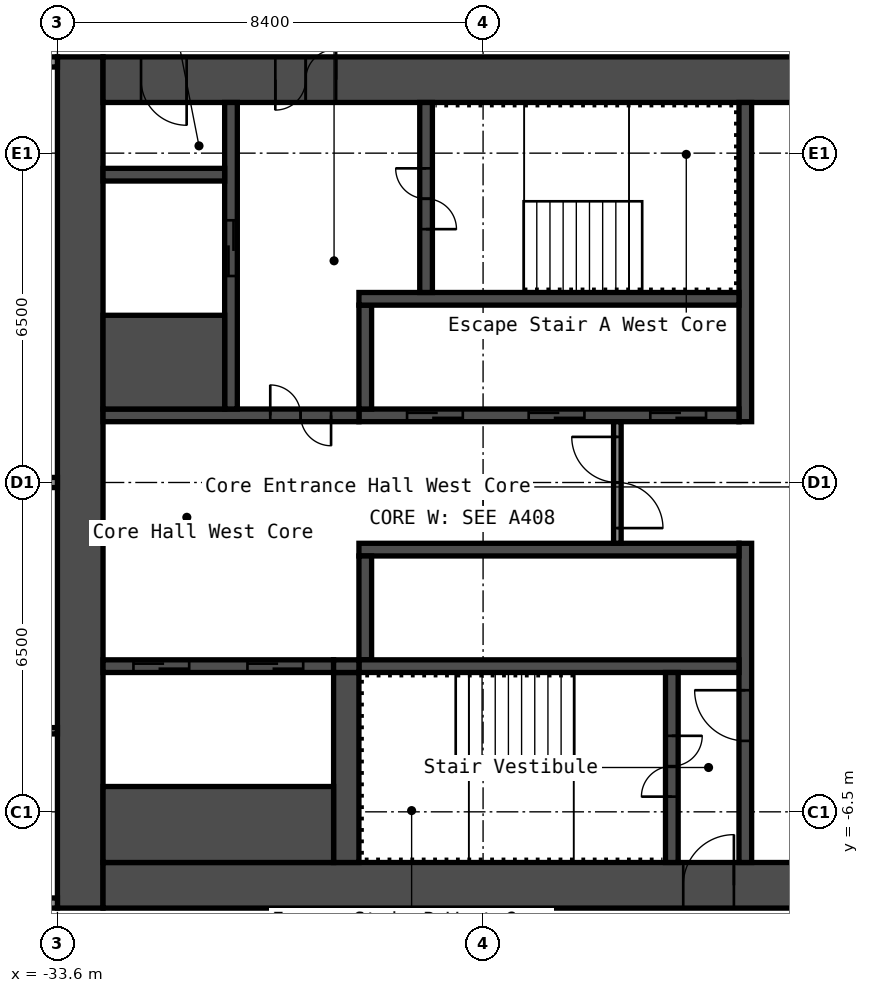
"""IFC4 building model, lengths in metres.
Left out: names, types, materials, properties, quantities, classifications, styles, units other than length and angle.
Written with IfcOpenShell. Run it as: python <this file> out.ifc"""

import sys

from ifc_helpers import new_model, si_unit, direction, frame, frame_2d, origin, place, context, subcontext, project, spatial, rectangle, extrude, element, fill, save


model = new_model("IFC4")
c1 = context("Model", 3, precision=1e-05, world=origin(), true_north=direction((0.0, 1.0)))
c2 = subcontext(c1, "Body", "Model", "MODEL_VIEW")
j1 = project(units=[si_unit("LENGTHUNIT", "METRE"), si_unit("PLANEANGLEUNIT", "RADIAN")], contexts=[c1])
p1 = place(None, origin())
s1 = spatial("IfcSite", under=j1, at=p1, CompositionType="ELEMENT")
p2 = place(p1, origin())
s2 = spatial("IfcBuilding", under=s1, at=p2, CompositionType="ELEMENT")
p3 = place(p2, frame((0.0, 0.0, 58.2)))
s3 = spatial("IfcBuildingStorey", under=s2, at=p3, CompositionType="ELEMENT", Elevation=58.2)
p4 = place(p3, frame((-33.15, -8.4, 0.0), z_axis=(0.0, 0.0, 1.0), x_axis=(0.0, 1.0, 0.0)))
e1 = element("IfcWall", 1, at=p4, inside=s3, PredefinedType="SHEAR", context=c2, shape_type="SweptSolid", body=[
    extrude(rectangle(XDim=16.8, YDim=0.9, at=frame_2d((8.4, 0.0))), origin(), (0.0, 0.0, 1.0), 2.8),
])
p5 = place(p3, frame((-32.7, 7.95, 0.0), z_axis=(0.0, 0.0, 1.0), x_axis=(1.0, 0.0, 0.0)))
e2 = element("IfcWall", 2, at=p5, inside=s3, PredefinedType="SHEAR", context=c2, shape_type="SweptSolid", body=[
    extrude(rectangle(XDim=15.0, YDim=0.9, at=frame_2d((7.5, 0.0))), origin(), (0.0, 0.0, 1.0), 2.8),
])
p6 = place(p5, frame((3.4, 0.0, 0.0)))
e3 = element("IfcOpeningElement", 3, at=p6, cuts=e2, PredefinedType="OPENING", context=c2, shape_type="SweptSolid", body=[
    extrude(rectangle(XDim=1.2, YDim=2.1, at=frame_2d((0.6, 1.05))), frame((0.0, 0.46, 0.0), z_axis=(0.0, -1.0, 0.0), x_axis=(1.0, 0.0, 0.0)), (0.0, 0.0, 1.0), 0.92),
])
p7 = place(p5, frame((0.75, 0.0, 0.0)))
e4 = element("IfcOpeningElement", 4, at=p7, cuts=e2, PredefinedType="OPENING", context=c2, shape_type="SweptSolid", body=[
    extrude(rectangle(XDim=0.9, YDim=2.1, at=frame_2d((0.45, 1.05))), frame((0.0, 0.46, 0.0), z_axis=(0.0, -1.0, 0.0), x_axis=(1.0, 0.0, 0.0)), (0.0, 0.0, 1.0), 0.92),
])
p8 = place(p3, frame((-32.7, -7.95, 0.0), z_axis=(0.0, 0.0, 1.0), x_axis=(1.0, 0.0, 0.0)))
e5 = element("IfcWall", 5, at=p8, inside=s3, PredefinedType="SHEAR", context=c2, shape_type="SweptSolid", body=[
    extrude(rectangle(XDim=15.0, YDim=0.9, at=frame_2d((7.5, 0.0))), origin(), (0.0, 0.0, 1.0), 2.8),
])
p9 = place(p8, frame((11.45, 0.0, 0.0)))
e6 = element("IfcOpeningElement", 6, at=p9, cuts=e5, PredefinedType="OPENING", context=c2, shape_type="SweptSolid", body=[
    extrude(rectangle(XDim=1.0, YDim=2.1, at=frame_2d((0.5, 1.05))), frame((0.0, 0.46, 0.0), z_axis=(0.0, -1.0, 0.0), x_axis=(1.0, 0.0, 0.0)), (0.0, 0.0, 1.0), 0.92),
])
p10 = place(p3, frame((-20.025, 1.2, 0.0), z_axis=(0.0, 0.0, 1.0), x_axis=(0.0, 1.0, 0.0)))
e7 = element("IfcWall", 7, at=p10, inside=s3, PredefinedType="SHEAR", context=c2, shape_type="SweptSolid", body=[
    extrude(rectangle(XDim=6.3, YDim=0.25, at=frame_2d((3.15, 0.0))), origin(), (0.0, 0.0, 1.0), 2.8),
])
p11 = place(p3, frame((-20.025, -7.5, 0.0), z_axis=(0.0, 0.0, 1.0), x_axis=(0.0, 1.0, 0.0)))
e8 = element("IfcWall", 8, at=p11, inside=s3, PredefinedType="SHEAR", context=c2, shape_type="SweptSolid", body=[
    extrude(rectangle(XDim=6.3, YDim=0.25, at=frame_2d((3.15, 0.0))), origin(), (0.0, 0.0, 1.0), 2.8),
])
p12 = place(p11, frame((2.4, 0.0, 0.0)))
e9 = element("IfcOpeningElement", 9, at=p12, cuts=e8, PredefinedType="OPENING", context=c2, shape_type="SweptSolid", body=[
    extrude(rectangle(XDim=1.0, YDim=2.1, at=frame_2d((0.5, 1.05))), frame((0.0, 0.135, 0.0), z_axis=(0.0, -1.0, 0.0), x_axis=(1.0, 0.0, 0.0)), (0.0, 0.0, 1.0), 0.27),
])
p13 = place(p3, frame((-27.65, 1.325, 0.0), z_axis=(0.0, 0.0, 1.0), x_axis=(1.0, 0.0, 0.0)))
e10 = element("IfcWall", 10, at=p13, inside=s3, PredefinedType="SHEAR", context=c2, shape_type="SweptSolid", body=[
    extrude(rectangle(XDim=7.5, YDim=0.25, at=frame_2d((3.75, 0.0))), origin(), (0.0, 0.0, 1.0), 2.8),
])
p14 = place(p13, frame((5.75, 0.0, 0.0)))
e11 = element("IfcOpeningElement", 11, at=p14, cuts=e10, PredefinedType="OPENING", context=c2, shape_type="SweptSolid", body=[
    extrude(rectangle(XDim=1.1, YDim=2.1, at=frame_2d((0.55, 1.05))), frame((0.0, 0.135, 0.0), z_axis=(0.0, -1.0, 0.0), x_axis=(1.0, 0.0, 0.0)), (0.0, 0.0, 1.0), 0.27),
])
p15 = place(p13, frame((3.35, 0.0, 0.0)))
e12 = element("IfcOpeningElement", 12, at=p15, cuts=e10, PredefinedType="OPENING", context=c2, shape_type="SweptSolid", body=[
    extrude(rectangle(XDim=1.1, YDim=2.1, at=frame_2d((0.55, 1.05))), frame((0.0, 0.135, 0.0), z_axis=(0.0, -1.0, 0.0), x_axis=(1.0, 0.0, 0.0)), (0.0, 0.0, 1.0), 0.27),
])
p16 = place(p13, frame((0.95, 0.0, 0.0)))
e13 = element("IfcOpeningElement", 13, at=p16, cuts=e10, PredefinedType="OPENING", context=c2, shape_type="SweptSolid", body=[
    extrude(rectangle(XDim=1.1, YDim=2.1, at=frame_2d((0.55, 1.05))), frame((0.0, 0.135, 0.0), z_axis=(0.0, -1.0, 0.0), x_axis=(1.0, 0.0, 0.0)), (0.0, 0.0, 1.0), 0.27),
])
p17 = place(p3, frame((-27.525, 1.45, 0.0), z_axis=(0.0, 0.0, 1.0), x_axis=(0.0, 1.0, 0.0)))
e14 = element("IfcWall", 14, at=p17, inside=s3, PredefinedType="SHEAR", context=c2, shape_type="SweptSolid", body=[
    extrude(rectangle(XDim=2.05, YDim=0.25, at=frame_2d((1.025, 0.0))), origin(), (0.0, 0.0, 1.0), 2.8),
])
p18 = place(p3, frame((-27.65, 3.625, 0.0), z_axis=(0.0, 0.0, 1.0), x_axis=(1.0, 0.0, 0.0)))
e15 = element("IfcWall", 15, at=p18, inside=s3, PredefinedType="SHEAR", context=c2, shape_type="SweptSolid", body=[
    extrude(rectangle(XDim=7.5, YDim=0.25, at=frame_2d((3.75, 0.0))), origin(), (0.0, 0.0, 1.0), 2.8),
])
p19 = place(p3, frame((-26.325, 3.75, 0.0), z_axis=(0.0, 0.0, 1.0), x_axis=(0.0, 1.0, 0.0)))
e16 = element("IfcWall", 16, at=p19, inside=s3, PredefinedType="SHEAR", context=c2, shape_type="SweptSolid", body=[
    extrude(rectangle(XDim=3.75, YDim=0.25, at=frame_2d((1.875, 0.0))), origin(), (0.0, 0.0, 1.0), 2.8),
])
p20 = place(p19, frame((1.25, 0.0, 0.0)))
e17 = element("IfcOpeningElement", 17, at=p20, cuts=e16, PredefinedType="OPENING", context=c2, shape_type="SweptSolid", body=[
    extrude(rectangle(XDim=1.2, YDim=2.1, at=frame_2d((0.6, 1.05))), frame((0.0, 0.135, 0.0), z_axis=(0.0, -1.0, 0.0), x_axis=(1.0, 0.0, 0.0)), (0.0, 0.0, 1.0), 0.27),
])
p21 = place(p3, frame((-32.7, 1.325, 0.0), z_axis=(0.0, 0.0, 1.0), x_axis=(1.0, 0.0, 0.0)))
e18 = element("IfcWall", 18, at=p21, inside=s3, PredefinedType="SHEAR", context=c2, shape_type="SweptSolid", body=[
    extrude(rectangle(XDim=5.05, YDim=0.25, at=frame_2d((2.525, 0.0))), origin(), (0.0, 0.0, 1.0), 2.8),
])
p22 = place(p21, frame((3.3, 0.0, 0.0)))
e19 = element("IfcOpeningElement", 19, at=p22, cuts=e18, PredefinedType="OPENING", context=c2, shape_type="SweptSolid", body=[
    extrude(rectangle(XDim=1.2, YDim=2.1, at=frame_2d((0.6, 1.05))), frame((0.0, 0.135, 0.0), z_axis=(0.0, -1.0, 0.0), x_axis=(1.0, 0.0, 0.0)), (0.0, 0.0, 1.0), 0.27),
])
p23 = place(p3, frame((-30.175, 1.45, 0.0), z_axis=(0.0, 0.0, 1.0), x_axis=(0.0, 1.0, 0.0)))
e20 = element("IfcWall", 20, at=p23, inside=s3, PredefinedType="SHEAR", context=c2, shape_type="SweptSolid", body=[
    extrude(rectangle(XDim=6.05, YDim=0.25, at=frame_2d((3.025, 0.0))), origin(), (0.0, 0.0, 1.0), 2.8),
])
p24 = place(p23, frame((2.625, 0.0, 0.0)))
e21 = element("IfcOpeningElement", 21, at=p24, cuts=e20, PredefinedType="OPENING", context=c2, shape_type="SweptSolid", body=[
    extrude(rectangle(XDim=1.1, YDim=2.1, at=frame_2d((0.55, 1.05))), frame((0.0, 0.135, 0.0), z_axis=(0.0, -1.0, 0.0), x_axis=(1.0, 0.0, 0.0)), (0.0, 0.0, 1.0), 0.27),
])
p25 = place(p3, frame((-32.7, 2.375, 0.0), z_axis=(0.0, 0.0, 1.0), x_axis=(1.0, 0.0, 0.0)))
e22 = element("IfcWall", 22, at=p25, inside=s3, PredefinedType="SHEAR", context=c2, shape_type="SweptSolid", body=[
    extrude(rectangle(XDim=2.4, YDim=1.85, at=frame_2d((1.2, 0.0))), origin(), (0.0, 0.0, 1.0), 2.8),
])
p26 = place(p3, frame((-32.7, 6.075, 0.0), z_axis=(0.0, 0.0, 1.0), x_axis=(1.0, 0.0, 0.0)))
e23 = element("IfcWall", 23, at=p26, inside=s3, PredefinedType="SHEAR", context=c2, shape_type="SweptSolid", body=[
    extrude(rectangle(XDim=2.4, YDim=0.25, at=frame_2d((1.2, 0.0))), origin(), (0.0, 0.0, 1.0), 2.8),
])
p27 = place(p3, frame((-27.65, -1.325, 0.0), z_axis=(0.0, 0.0, 1.0), x_axis=(1.0, 0.0, 0.0)))
e24 = element("IfcWall", 24, at=p27, inside=s3, PredefinedType="SHEAR", context=c2, shape_type="SweptSolid", body=[
    extrude(rectangle(XDim=7.5, YDim=0.25, at=frame_2d((3.75, 0.0))), origin(), (0.0, 0.0, 1.0), 2.8),
])
p28 = place(p3, frame((-27.525, -3.5, 0.0), z_axis=(0.0, 0.0, 1.0), x_axis=(0.0, 1.0, 0.0)))
e25 = element("IfcWall", 25, at=p28, inside=s3, PredefinedType="SHEAR", context=c2, shape_type="SweptSolid", body=[
    extrude(rectangle(XDim=2.05, YDim=0.25, at=frame_2d((1.025, 0.0))), origin(), (0.0, 0.0, 1.0), 2.8),
])
p29 = place(p3, frame((-27.65, -3.625, 0.0), z_axis=(0.0, 0.0, 1.0), x_axis=(1.0, 0.0, 0.0)))
e26 = element("IfcWall", 26, at=p29, inside=s3, PredefinedType="SHEAR", context=c2, shape_type="SweptSolid", body=[
    extrude(rectangle(XDim=7.5, YDim=0.25, at=frame_2d((3.75, 0.0))), origin(), (0.0, 0.0, 1.0), 2.8),
])
p30 = place(p3, frame((-21.475, -7.5, 0.0), z_axis=(0.0, 0.0, 1.0), x_axis=(0.0, 1.0, 0.0)))
e27 = element("IfcWall", 27, at=p30, inside=s3, PredefinedType="SHEAR", context=c2, shape_type="SweptSolid", body=[
    extrude(rectangle(XDim=3.75, YDim=0.25, at=frame_2d((1.875, 0.0))), origin(), (0.0, 0.0, 1.0), 2.8),
])
p31 = place(p30, frame((1.3, 0.0, 0.0)))
e28 = element("IfcOpeningElement", 28, at=p31, cuts=e27, PredefinedType="OPENING", context=c2, shape_type="SweptSolid", body=[
    extrude(rectangle(XDim=1.2, YDim=2.1, at=frame_2d((0.6, 1.05))), frame((0.0, 0.135, 0.0), z_axis=(0.0, -1.0, 0.0), x_axis=(1.0, 0.0, 0.0)), (0.0, 0.0, 1.0), 0.27),
])
p32 = place(p3, frame((-27.9, -7.5, 0.0), z_axis=(0.0, 0.0, 1.0), x_axis=(0.0, 1.0, 0.0)))
e29 = element("IfcWall", 29, at=p32, inside=s3, PredefinedType="SHEAR", context=c2, shape_type="SweptSolid", body=[
    extrude(rectangle(XDim=3.75, YDim=0.5, at=frame_2d((1.875, 0.0))), origin(), (0.0, 0.0, 1.0), 2.8),
])
p33 = place(p3, frame((-32.7, -3.625, 0.0), z_axis=(0.0, 0.0, 1.0), x_axis=(1.0, 0.0, 0.0)))
e30 = element("IfcWall", 30, at=p33, inside=s3, PredefinedType="SHEAR", context=c2, shape_type="SweptSolid", body=[
    extrude(rectangle(XDim=4.55, YDim=0.25, at=frame_2d((2.275, 0.0))), origin(), (0.0, 0.0, 1.0), 2.8),
])
p34 = place(p33, frame((2.85, 0.0, 0.0)))
e31 = element("IfcOpeningElement", 31, at=p34, cuts=e30, PredefinedType="OPENING", context=c2, shape_type="SweptSolid", body=[
    extrude(rectangle(XDim=1.1, YDim=2.1, at=frame_2d((0.55, 1.05))), frame((0.0, 0.135, 0.0), z_axis=(0.0, -1.0, 0.0), x_axis=(1.0, 0.0, 0.0)), (0.0, 0.0, 1.0), 0.27),
])
p35 = place(p33, frame((0.6, 0.0, 0.0)))
e32 = element("IfcOpeningElement", 32, at=p35, cuts=e30, PredefinedType="OPENING", context=c2, shape_type="SweptSolid", body=[
    extrude(rectangle(XDim=1.1, YDim=2.1, at=frame_2d((0.55, 1.05))), frame((0.0, 0.135, 0.0), z_axis=(0.0, -1.0, 0.0), x_axis=(1.0, 0.0, 0.0)), (0.0, 0.0, 1.0), 0.27),
])
p36 = place(p3, frame((-32.7, -6.75, 0.0), z_axis=(0.0, 0.0, 1.0), x_axis=(1.0, 0.0, 0.0)))
e33 = element("IfcWall", 33, at=p36, inside=s3, PredefinedType="SHEAR", context=c2, shape_type="SweptSolid", body=[
    extrude(rectangle(XDim=4.55, YDim=1.5, at=frame_2d((2.275, 0.0))), origin(), (0.0, 0.0, 1.0), 2.8),
])
p37 = place(p3, frame((-28.15, -3.625, 0.0), z_axis=(0.0, 0.0, 1.0), x_axis=(1.0, 0.0, 0.0)))
e34 = element("IfcWall", 34, at=p37, inside=s3, PredefinedType="SHEAR", context=c2, shape_type="SweptSolid", body=[
    extrude(rectangle(XDim=0.5, YDim=0.25, at=frame_2d((0.25, 0.0))), origin(), (0.0, 0.0, 1.0), 2.8),
])
p38 = place(p3, frame((-22.55, -1.2, 0.0), z_axis=(0.0, 0.0, 1.0), x_axis=(0.0, 1.0, 0.0)))
e35 = element("IfcWall", 35, at=p38, inside=s3, PredefinedType="PARTITIONING", context=c2, shape_type="SweptSolid", body=[
    extrude(rectangle(XDim=2.4, YDim=0.15, at=frame_2d((1.2, 0.0))), origin(), (0.0, 0.0, 1.0), 2.8),
])
p39 = place(p38, frame((0.3, 0.0, 0.0)))
e36 = element("IfcOpeningElement", 36, at=p39, cuts=e35, PredefinedType="OPENING", context=c2, shape_type="SweptSolid", body=[
    extrude(rectangle(XDim=1.8, YDim=2.1, at=frame_2d((0.9, 1.05))), frame((0.0, 0.085, 0.0), z_axis=(0.0, -1.0, 0.0), x_axis=(1.0, 0.0, 0.0)), (0.0, 0.0, 1.0), 0.17),
])
p40 = place(p3, frame((-48.6, -8.3, 0.0), z_axis=(0.0, 0.0, 1.0), x_axis=(1.0, 0.0, 0.0)))
e37 = element("IfcWall", 37, at=p40, inside=s3, PredefinedType="PARTITIONING", context=c2, shape_type="SweptSolid", body=[
    extrude(rectangle(XDim=15.0, YDim=0.2, at=frame_2d((7.5, 0.0))), origin(), (0.0, 0.0, 1.0), 2.8),
])
p41 = place(p40, frame((4.5, 0.0, 0.0)))
e38 = element("IfcOpeningElement", 38, at=p41, cuts=e37, PredefinedType="OPENING", context=c2, shape_type="SweptSolid", body=[
    extrude(rectangle(XDim=1.0, YDim=2.1, at=frame_2d((0.5, 1.05))), frame((0.0, 0.11, 0.0), z_axis=(0.0, -1.0, 0.0), x_axis=(1.0, 0.0, 0.0)), (0.0, 0.0, 1.0), 0.22),
])
p42 = place(p40, frame((8.6, 0.0, 0.0)))
e39 = element("IfcOpeningElement", 39, at=p42, cuts=e37, PredefinedType="OPENING", context=c2, shape_type="SweptSolid", body=[
    extrude(rectangle(XDim=1.0, YDim=2.1, at=frame_2d((0.5, 1.05))), frame((0.0, 0.11, 0.0), z_axis=(0.0, -1.0, 0.0), x_axis=(1.0, 0.0, 0.0)), (0.0, 0.0, 1.0), 0.22),
])
p43 = place(p3, frame((-36.938, -4.9, 0.0), z_axis=(0.0, 0.0, 1.0), x_axis=(1.0, 0.0, 0.0)))
e40 = element("IfcWall", 40, at=p43, inside=s3, PredefinedType="PARTITIONING", context=c2, shape_type="SweptSolid", body=[
    extrude(rectangle(XDim=3.337, YDim=0.125, at=frame_2d((1.669, 0.0))), origin(), (0.0, 0.0, 1.0), 2.8),
])
p44 = place(p43, frame((1.238, 0.0, 0.0)))
e41 = element("IfcOpeningElement", 41, at=p44, cuts=e40, PredefinedType="OPENING", context=c2, shape_type="SweptSolid", body=[
    extrude(rectangle(XDim=0.8, YDim=2.1, at=frame_2d((0.4, 1.05))), frame((0.0, 0.073, 0.0), z_axis=(0.0, -1.0, 0.0), x_axis=(1.0, 0.0, 0.0)), (0.0, 0.0, 1.0), 0.145),
])
p45 = place(p3, frame((-48.5, 0.0, 0.0), z_axis=(0.0, 0.0, 1.0), x_axis=(1.0, 0.0, 0.0)))
e42 = element("IfcWall", 42, at=p45, inside=s3, PredefinedType="PARTITIONING", context=c2, shape_type="SweptSolid", body=[
    extrude(rectangle(XDim=14.9, YDim=0.2, at=frame_2d((7.45, 0.0))), origin(), (0.0, 0.0, 1.0), 2.8),
])
p46 = place(p3, frame((-48.6, 8.3, 0.0), z_axis=(0.0, 0.0, 1.0), x_axis=(1.0, 0.0, 0.0)))
e43 = element("IfcWall", 43, at=p46, inside=s3, PredefinedType="PARTITIONING", context=c2, shape_type="SweptSolid", body=[
    extrude(rectangle(XDim=15.0, YDim=0.2, at=frame_2d((7.5, 0.0))), origin(), (0.0, 0.0, 1.0), 2.8),
])
p47 = place(p46, frame((9.55, 0.0, 0.0)))
e44 = element("IfcOpeningElement", 44, at=p47, cuts=e43, PredefinedType="OPENING", context=c2, shape_type="SweptSolid", body=[
    extrude(rectangle(XDim=1.6, YDim=2.1, at=frame_2d((0.8, 1.05))), frame((0.0, 0.11, 0.0), z_axis=(0.0, -1.0, 0.0), x_axis=(1.0, 0.0, 0.0)), (0.0, 0.0, 1.0), 0.22),
])
p48 = place(p6, origin())
e45 = element("IfcDoor", 45, at=p48, inside=s3, OperationType="DOUBLE_DOOR_SINGLE_SWING", PredefinedType="DOOR", context=c2, shape_type="SweptSolid", body=[
    extrude(rectangle(XDim=1.2, YDim=2.1, at=frame_2d((0.6, 1.05))), frame((0.0, 0.025, 0.0), z_axis=(0.0, -1.0, 0.0), x_axis=(1.0, 0.0, 0.0)), (0.0, 0.0, 1.0), 0.05),
])
fill(e3, e45)
p49 = place(p7, origin())
e46 = element("IfcDoor", 46, at=p49, inside=s3, OperationType="SINGLE_SWING_RIGHT", PredefinedType="DOOR", context=c2, shape_type="SweptSolid", body=[
    extrude(rectangle(XDim=0.9, YDim=2.1, at=frame_2d((0.45, 1.05))), frame((0.0, 0.025, 0.0), z_axis=(0.0, -1.0, 0.0), x_axis=(1.0, 0.0, 0.0)), (0.0, 0.0, 1.0), 0.05),
])
fill(e4, e46)
p50 = place(p9, origin())
e47 = element("IfcDoor", 47, at=p50, inside=s3, OperationType="SINGLE_SWING_LEFT", PredefinedType="DOOR", context=c2, shape_type="SweptSolid", body=[
    extrude(rectangle(XDim=1.0, YDim=2.1, at=frame_2d((0.5, 1.05))), frame((0.0, 0.025, 0.0), z_axis=(0.0, -1.0, 0.0), x_axis=(1.0, 0.0, 0.0)), (0.0, 0.0, 1.0), 0.05),
])
fill(e6, e47)
p51 = place(p20, origin())
e48 = element("IfcDoor", 48, at=p51, inside=s3, OperationType="DOUBLE_DOOR_SINGLE_SWING", PredefinedType="DOOR", context=c2, shape_type="SweptSolid", body=[
    extrude(rectangle(XDim=1.2, YDim=2.1, at=frame_2d((0.6, 1.05))), frame((0.0, 0.025, 0.0), z_axis=(0.0, -1.0, 0.0), x_axis=(1.0, 0.0, 0.0)), (0.0, 0.0, 1.0), 0.05),
])
fill(e17, e48)
p52 = place(p31, origin())
e49 = element("IfcDoor", 49, at=p52, inside=s3, OperationType="DOUBLE_DOOR_SINGLE_SWING", PredefinedType="DOOR", context=c2, shape_type="SweptSolid", body=[
    extrude(rectangle(XDim=1.2, YDim=2.1, at=frame_2d((0.6, 1.05))), frame((0.0, 0.025, 0.0), z_axis=(0.0, -1.0, 0.0), x_axis=(1.0, 0.0, 0.0)), (0.0, 0.0, 1.0), 0.05),
])
fill(e28, e49)
p53 = place(p12, origin())
e50 = element("IfcDoor", 50, at=p53, inside=s3, OperationType="SINGLE_SWING_LEFT", PredefinedType="DOOR", context=c2, shape_type="SweptSolid", body=[
    extrude(rectangle(XDim=1.0, YDim=2.1, at=frame_2d((0.5, 1.05))), frame((0.0, 0.025, 0.0), z_axis=(0.0, -1.0, 0.0), x_axis=(1.0, 0.0, 0.0)), (0.0, 0.0, 1.0), 0.05),
])
fill(e9, e50)
p54 = place(p22, origin())
e51 = element("IfcDoor", 51, at=p54, inside=s3, OperationType="DOUBLE_DOOR_SINGLE_SWING", PredefinedType="DOOR", context=c2, shape_type="SweptSolid", body=[
    extrude(rectangle(XDim=1.2, YDim=2.1, at=frame_2d((0.6, 1.05))), frame((0.0, 0.025, 0.0), z_axis=(0.0, -1.0, 0.0), x_axis=(1.0, 0.0, 0.0)), (0.0, 0.0, 1.0), 0.05),
])
fill(e19, e51)
p55 = place(p39, origin())
e52 = element("IfcDoor", 52, at=p55, inside=s3, OperationType="DOUBLE_DOOR_SINGLE_SWING", PredefinedType="DOOR", context=c2, shape_type="SweptSolid", body=[
    extrude(rectangle(XDim=1.8, YDim=2.1, at=frame_2d((0.9, 1.05))), frame((0.0, 0.025, 0.0), z_axis=(0.0, -1.0, 0.0), x_axis=(1.0, 0.0, 0.0)), (0.0, 0.0, 1.0), 0.05),
])
fill(e36, e52)
p56 = place(p14, origin())
e53 = element("IfcDoor", 53, at=p56, inside=s3, OperationType="DOUBLE_DOOR_SLIDING", PredefinedType="DOOR", context=c2, shape_type="SweptSolid", body=[
    extrude(rectangle(XDim=1.1, YDim=2.1, at=frame_2d((0.55, 1.05))), frame((0.0, 0.025, 0.0), z_axis=(0.0, -1.0, 0.0), x_axis=(1.0, 0.0, 0.0)), (0.0, 0.0, 1.0), 0.05),
])
fill(e11, e53)
p57 = place(p15, origin())
e54 = element("IfcDoor", 54, at=p57, inside=s3, OperationType="DOUBLE_DOOR_SLIDING", PredefinedType="DOOR", context=c2, shape_type="SweptSolid", body=[
    extrude(rectangle(XDim=1.1, YDim=2.1, at=frame_2d((0.55, 1.05))), frame((0.0, 0.025, 0.0), z_axis=(0.0, -1.0, 0.0), x_axis=(1.0, 0.0, 0.0)), (0.0, 0.0, 1.0), 0.05),
])
fill(e12, e54)
p58 = place(p16, origin())
e55 = element("IfcDoor", 55, at=p58, inside=s3, OperationType="DOUBLE_DOOR_SLIDING", PredefinedType="DOOR", context=c2, shape_type="SweptSolid", body=[
    extrude(rectangle(XDim=1.1, YDim=2.1, at=frame_2d((0.55, 1.05))), frame((0.0, 0.025, 0.0), z_axis=(0.0, -1.0, 0.0), x_axis=(1.0, 0.0, 0.0)), (0.0, 0.0, 1.0), 0.05),
])
fill(e13, e55)
p59 = place(p24, origin())
e56 = element("IfcDoor", 56, at=p59, inside=s3, OperationType="DOUBLE_DOOR_SLIDING", PredefinedType="DOOR", context=c2, shape_type="SweptSolid", body=[
    extrude(rectangle(XDim=1.1, YDim=2.1, at=frame_2d((0.55, 1.05))), frame((0.0, 0.025, 0.0), z_axis=(0.0, -1.0, 0.0), x_axis=(1.0, 0.0, 0.0)), (0.0, 0.0, 1.0), 0.05),
])
fill(e21, e56)
p60 = place(p34, origin())
e57 = element("IfcDoor", 57, at=p60, inside=s3, OperationType="DOUBLE_DOOR_SLIDING", PredefinedType="DOOR", context=c2, shape_type="SweptSolid", body=[
    extrude(rectangle(XDim=1.1, YDim=2.1, at=frame_2d((0.55, 1.05))), frame((0.0, 0.025, 0.0), z_axis=(0.0, -1.0, 0.0), x_axis=(1.0, 0.0, 0.0)), (0.0, 0.0, 1.0), 0.05),
])
fill(e31, e57)
p61 = place(p35, origin())
e58 = element("IfcDoor", 58, at=p61, inside=s3, OperationType="DOUBLE_DOOR_SLIDING", PredefinedType="DOOR", context=c2, shape_type="SweptSolid", body=[
    extrude(rectangle(XDim=1.1, YDim=2.1, at=frame_2d((0.55, 1.05))), frame((0.0, 0.025, 0.0), z_axis=(0.0, -1.0, 0.0), x_axis=(1.0, 0.0, 0.0)), (0.0, 0.0, 1.0), 0.05),
])
fill(e32, e58)
save(model, sys.argv[1])
